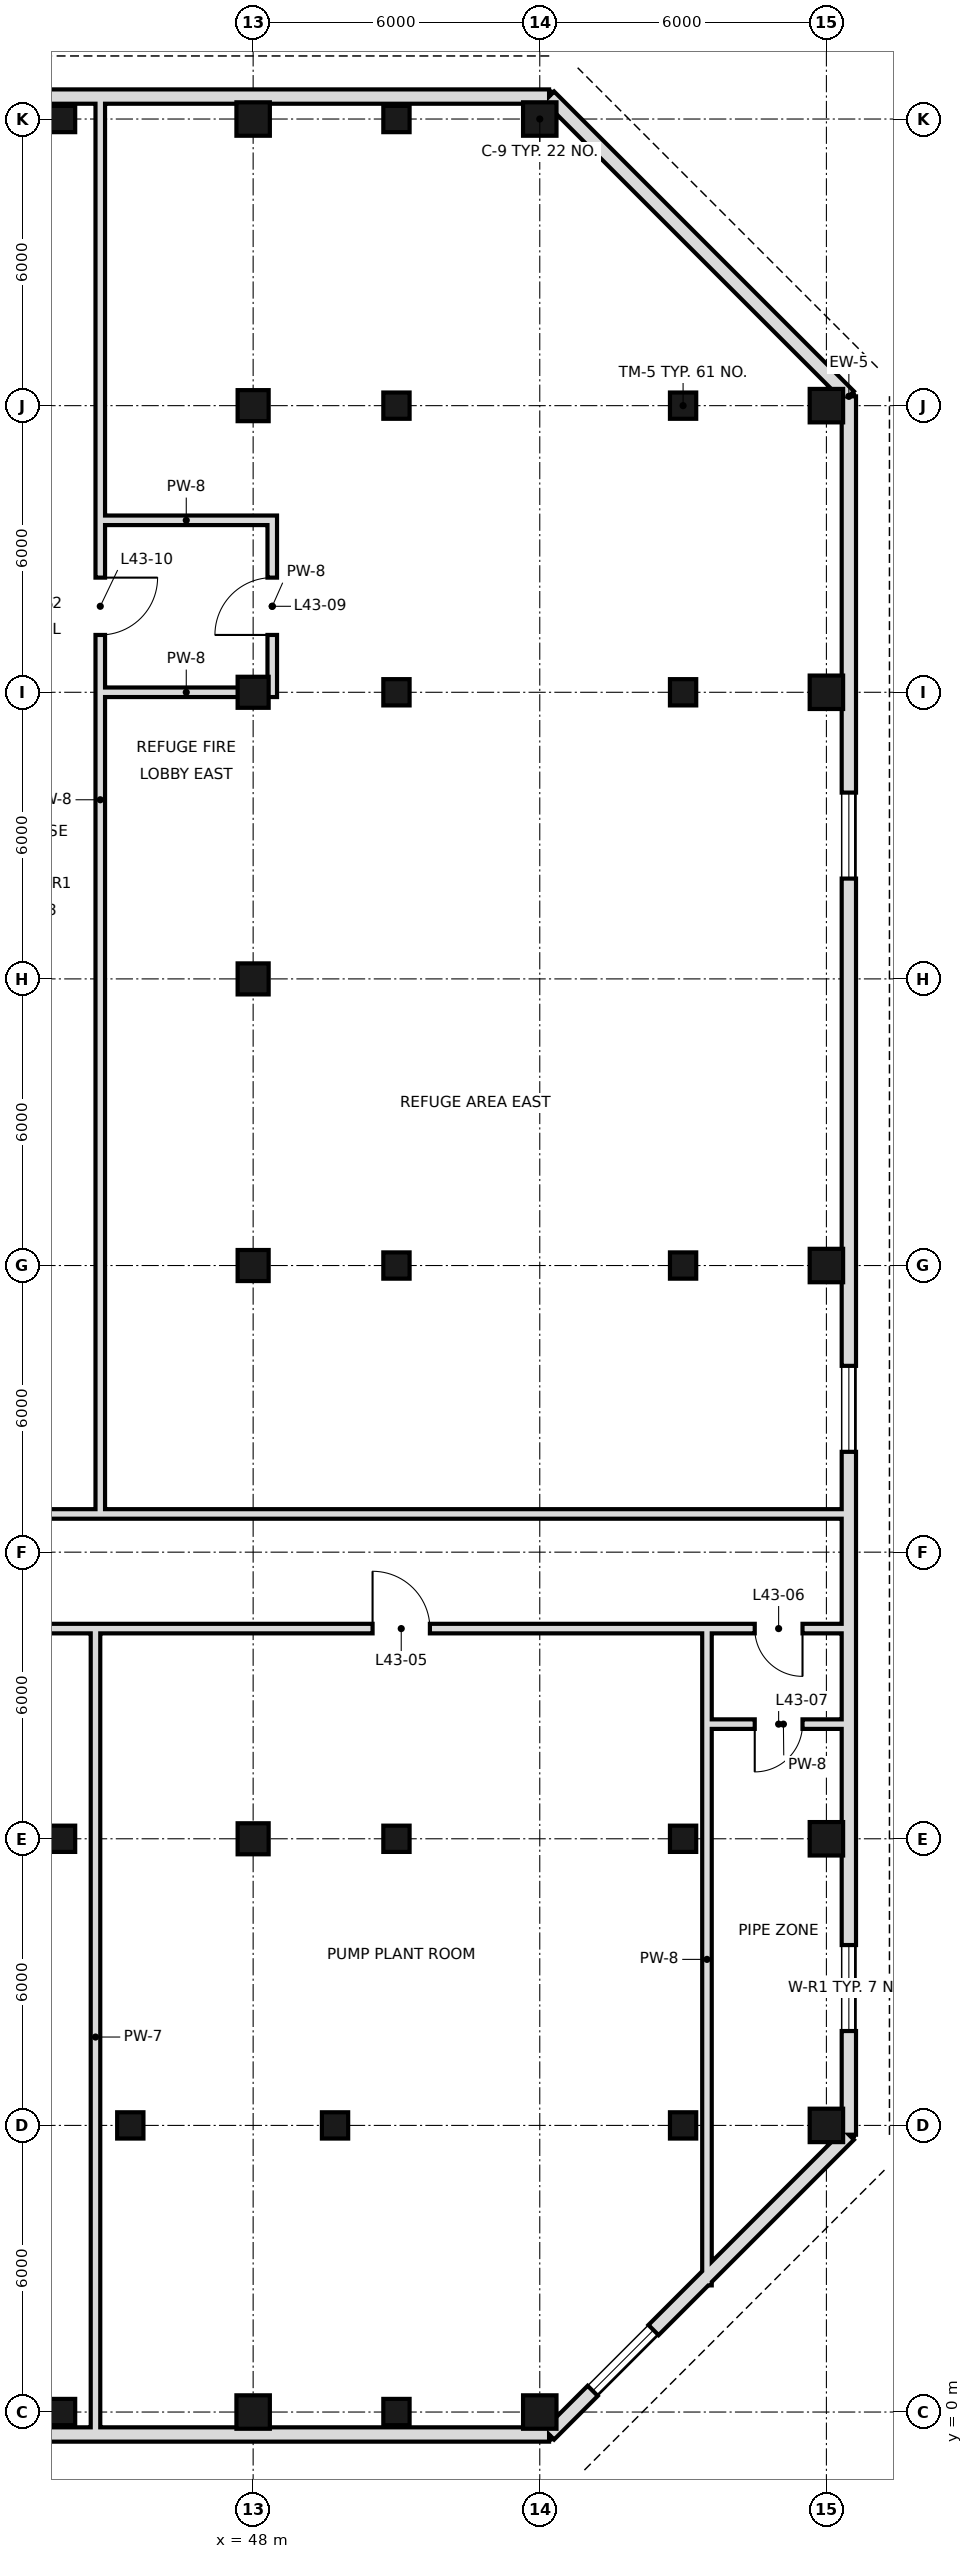
"""IFC4 building model, lengths in metres.
Left out: names, types, materials, properties, quantities, classifications, styles, units other than length and angle.
Written with IfcOpenShell. Run it as: python <this file> out.ifc"""

import sys

from ifc_helpers import new_model, si_unit, direction, frame, frame_2d, origin, origin_2d, place, context, subcontext, project, spatial, rectangle, hollow_rectangle, extrude, element, fill, save


model = new_model("IFC4")
c1 = context("Model", 3, precision=1e-05, world=origin(), true_north=direction((0.0, 1.0)))
c2 = subcontext(c1, "Body", "Model", "MODEL_VIEW")
j1 = project(units=[si_unit("LENGTHUNIT", "METRE"), si_unit("PLANEANGLEUNIT", "RADIAN")], contexts=[c1])
p1 = place(None, origin())
s1 = spatial("IfcSite", under=j1, at=p1, CompositionType="ELEMENT")
p2 = place(p1, origin())
s2 = spatial("IfcBuilding", under=s1, at=p2, CompositionType="ELEMENT")
p3 = place(p2, frame((0.0, 0.0, 186.0)))
s3 = spatial("IfcBuildingStorey", under=s2, at=p3, CompositionType="ELEMENT", Elevation=186.0)
p4 = place(p3, frame((48.0, 0.0, 0.0), z_axis=(0.0, 0.0, 1.0), x_axis=(1.0, 0.0, 0.0)))
e1 = element("IfcColumn", 1, at=p4, inside=s3, PredefinedType="COLUMN", context=c2, shape_type="SweptSolid", body=[
    extrude(hollow_rectangle(XDim=0.7, YDim=0.7, WallThickness=0.036, at=origin_2d()), origin(), (0.0, 0.0, 1.0), 6.0),
])
for number, where, z_axis, x_axis in (
    (2, (48.0, 12.0, 0.0), (0.0, 0.0, 1.0), (1.0, 0.0, 0.0)),
    (3, (48.0, 24.0, 0.0), (0.0, 0.0, 1.0), (1.0, 0.0, 0.0)),
    (4, (48.0, 30.0, 0.0), (0.0, 0.0, 1.0), (1.0, 0.0, 0.0)),
    (5, (48.0, 36.0, 0.0), (0.0, 0.0, 1.0), (1.0, 0.0, 0.0)),
    (6, (48.0, 42.0, 0.0), (0.0, 0.0, 1.0), (1.0, 0.0, 0.0)),
):
    element("IfcColumn", number, at=place(p3, frame(where, z_axis=z_axis, x_axis=x_axis)), inside=s3, PredefinedType="COLUMN", context=c2, shape_type="SweptSolid", body=[
        extrude(hollow_rectangle(XDim=0.65, YDim=0.65, WallThickness=0.032, at=origin_2d()), origin(), (0.0, 0.0, 1.0), 6.0),
    ])
for number, where, z_axis, x_axis in (
    (7, (48.0, 48.0, 0.0), (0.0, 0.0, 1.0), (1.0, 0.0, 0.0)),
    (8, (54.0, 0.0, 0.0), (0.0, 0.0, 1.0), (1.0, 0.0, 0.0)),
    (9, (54.0, 48.0, 0.0), (0.0, 0.0, 1.0), (1.0, 0.0, 0.0)),
    (10, (60.0, 6.0, 0.0), (0.0, 0.0, 1.0), (1.0, 0.0, 0.0)),
    (11, (60.0, 12.0, 0.0), (0.0, 0.0, 1.0), (1.0, 0.0, 0.0)),
    (12, (60.0, 24.0, 0.0), (0.0, 0.0, 1.0), (1.0, 0.0, 0.0)),
    (13, (60.0, 36.0, 0.0), (0.0, 0.0, 1.0), (1.0, 0.0, 0.0)),
    (14, (60.0, 42.0, 0.0), (0.0, 0.0, 1.0), (1.0, 0.0, 0.0)),
):
    element("IfcColumn", number, at=place(p3, frame(where, z_axis=z_axis, x_axis=x_axis)), inside=s3, PredefinedType="COLUMN", context=c2, shape_type="SweptSolid", body=[
        extrude(hollow_rectangle(XDim=0.7, YDim=0.7, WallThickness=0.036, at=origin_2d()), origin(), (0.0, 0.0, 1.0), 6.0),
    ])
for number, where, z_axis, x_axis in (
    (15, (44.0, 0.0, 1.1), (0.0, 0.0, 1.0), (1.0, 0.0, 0.0)),
    (16, (51.0, 0.0, 1.1), (0.0, 0.0, 1.0), (1.0, 0.0, 0.0)),
    (17, (45.428, 6.0, 1.1), (0.0, 0.0, 1.0), (1.0, 0.0, 0.0)),
    (18, (49.714, 6.0, 1.1), (0.0, 0.0, 1.0), (1.0, 0.0, 0.0)),
    (19, (57.0, 6.0, 1.1), (0.0, 0.0, 1.0), (1.0, 0.0, 0.0)),
    (20, (44.0, 12.0, 1.1), (0.0, 0.0, 1.0), (1.0, 0.0, 0.0)),
    (21, (51.0, 12.0, 1.1), (0.0, 0.0, 1.0), (1.0, 0.0, 0.0)),
    (22, (57.0, 12.0, 1.1), (0.0, 0.0, 1.0), (1.0, 0.0, 0.0)),
    (23, (51.0, 24.0, 1.1), (0.0, 0.0, 1.0), (1.0, 0.0, 0.0)),
    (24, (57.0, 24.0, 1.1), (0.0, 0.0, 1.0), (1.0, 0.0, 0.0)),
    (25, (51.0, 36.0, 1.1), (0.0, 0.0, 1.0), (1.0, 0.0, 0.0)),
    (26, (57.0, 36.0, 1.1), (0.0, 0.0, 1.0), (1.0, 0.0, 0.0)),
    (27, (51.0, 42.0, 1.1), (0.0, 0.0, 1.0), (1.0, 0.0, 0.0)),
    (28, (57.0, 42.0, 1.1), (0.0, 0.0, 1.0), (1.0, 0.0, 0.0)),
    (29, (44.0, 48.0, 1.1), (0.0, 0.0, 1.0), (1.0, 0.0, 0.0)),
    (30, (51.0, 48.0, 1.1), (0.0, 0.0, 1.0), (1.0, 0.0, 0.0)),
):
    element("IfcColumn", number, at=place(p3, frame(where, z_axis=z_axis, x_axis=x_axis)), inside=s3, PredefinedType="COLUMN", context=c2, shape_type="SweptSolid", body=[
        extrude(hollow_rectangle(XDim=0.55, YDim=0.55, WallThickness=0.036, at=origin_2d()), origin(), (0.0, 0.0, 1.0), 3.5),
    ])
p5 = place(p3, frame((-0.195, -0.47, 0.0), z_axis=(0.0, 0.0, 1.0), x_axis=(1.0, 0.0, 0.0)))
e31 = element("IfcWall", 31, at=p5, inside=s3, PredefinedType="SOLIDWALL", context=c2, shape_type="SweptSolid", body=[
    extrude(rectangle(XDim=54.389, YDim=0.3, at=frame_2d((27.195, 0.0))), origin(), (0.0, 0.0, 1.0), 5.7),
])
p6 = place(p3, frame((54.195, -0.47, 0.0), z_axis=(0.0, 0.0, 1.0), x_axis=(0.707106781187, 0.707106781187, 0.0)))
e32 = element("IfcWall", 32, at=p6, inside=s3, PredefinedType="SOLIDWALL", context=c2, shape_type="SweptSolid", body=[
    extrude(rectangle(XDim=8.875, YDim=0.3, at=frame_2d((4.438, 0.0))), origin(), (0.0, 0.0, 1.0), 5.7),
])
p7 = place(p6, frame((1.292, 0.0, 0.9)))
e33 = element("IfcOpeningElement", 33, at=p7, cuts=e32, PredefinedType="OPENING", context=c2, shape_type="SweptSolid", body=[
    extrude(rectangle(XDim=1.8, YDim=1.5, at=frame_2d((0.9, 0.75))), frame((0.0, 0.16, 0.0), z_axis=(0.0, -1.0, 0.0), x_axis=(1.0, 0.0, 0.0)), (0.0, 0.0, 1.0), 0.32),
])
p8 = place(p3, frame((60.47, 5.805, 0.0), z_axis=(0.0, 0.0, 1.0), x_axis=(0.0, 1.0, 0.0)))
e34 = element("IfcWall", 34, at=p8, inside=s3, PredefinedType="SOLIDWALL", context=c2, shape_type="SweptSolid", body=[
    extrude(rectangle(XDim=36.389, YDim=0.3, at=frame_2d((18.195, 0.0))), origin(), (0.0, 0.0, 1.0), 5.7),
])
p9 = place(p8, frame((2.17, 0.0, 0.9)))
e35 = element("IfcOpeningElement", 35, at=p9, cuts=e34, PredefinedType="OPENING", context=c2, shape_type="SweptSolid", body=[
    extrude(rectangle(XDim=1.8, YDim=1.5, at=frame_2d((0.9, 0.75))), frame((0.0, 0.16, 0.0), z_axis=(0.0, -1.0, 0.0), x_axis=(1.0, 0.0, 0.0)), (0.0, 0.0, 1.0), 0.32),
])
p10 = place(p8, frame((14.295, 0.0, 0.9)))
e36 = element("IfcOpeningElement", 36, at=p10, cuts=e34, PredefinedType="OPENING", context=c2, shape_type="SweptSolid", body=[
    extrude(rectangle(XDim=1.8, YDim=1.5, at=frame_2d((0.9, 0.75))), frame((0.0, 0.16, 0.0), z_axis=(0.0, -1.0, 0.0), x_axis=(1.0, 0.0, 0.0)), (0.0, 0.0, 1.0), 0.32),
])
p11 = place(p8, frame((26.295, 0.0, 0.9)))
e37 = element("IfcOpeningElement", 37, at=p11, cuts=e34, PredefinedType="OPENING", context=c2, shape_type="SweptSolid", body=[
    extrude(rectangle(XDim=1.8, YDim=1.5, at=frame_2d((0.9, 0.75))), frame((0.0, 0.16, 0.0), z_axis=(0.0, -1.0, 0.0), x_axis=(1.0, 0.0, 0.0)), (0.0, 0.0, 1.0), 0.32),
])
p12 = place(p3, frame((60.47, 42.195, 0.0), z_axis=(0.0, 0.0, 1.0), x_axis=(-0.707106781187, 0.707106781187, 0.0)))
e38 = element("IfcWall", 38, at=p12, inside=s3, PredefinedType="SOLIDWALL", context=c2, shape_type="SweptSolid", body=[
    extrude(rectangle(XDim=8.875, YDim=0.3, at=frame_2d((4.438, 0.0))), origin(), (0.0, 0.0, 1.0), 5.7),
])
p13 = place(p3, frame((54.195, 48.47, 0.0), z_axis=(0.0, 0.0, 1.0), x_axis=(-1.0, 0.0, 0.0)))
e39 = element("IfcWall", 39, at=p13, inside=s3, PredefinedType="SOLIDWALL", context=c2, shape_type="SweptSolid", body=[
    extrude(rectangle(XDim=54.389, YDim=0.3, at=frame_2d((27.195, 0.0))), origin(), (0.0, 0.0, 1.0), 5.7),
])
p14 = place(p3, frame((44.7, -0.6, 0.0), z_axis=(0.0, 0.0, 1.0), x_axis=(0.0, 1.0, 0.0)))
e40 = element("IfcWall", 40, at=p14, inside=s3, PredefinedType="SOLIDWALL", context=c2, shape_type="SweptSolid", body=[
    extrude(rectangle(XDim=16.9, YDim=0.2, at=frame_2d((8.45, 0.0))), origin(), (0.0, 0.0, 1.0), 5.7),
])
p15 = place(p3, frame((44.8, 18.9, 0.0), z_axis=(0.0, 0.0, 1.0), x_axis=(0.0, 1.0, 0.0)))
e41 = element("IfcWall", 41, at=p15, inside=s3, PredefinedType="SOLIDWALL", context=c2, shape_type="SweptSolid", body=[
    extrude(rectangle(XDim=29.7, YDim=0.2, at=frame_2d((14.85, 0.0))), origin(), (0.0, 0.0, 1.0), 5.25),
])
p16 = place(p15, frame((18.3, 0.0, 0.0)))
e42 = element("IfcOpeningElement", 42, at=p16, cuts=e41, PredefinedType="OPENING", context=c2, shape_type="SweptSolid", body=[
    extrude(rectangle(XDim=1.2, YDim=2.4, at=frame_2d((0.6, 1.2))), frame((0.0, 0.11, 0.0), z_axis=(0.0, -1.0, 0.0), x_axis=(1.0, 0.0, 0.0)), (0.0, 0.0, 1.0), 0.22),
])
p17 = place(p3, frame((48.4, 35.9, 0.0), z_axis=(0.0, 0.0, 1.0), x_axis=(0.0, 1.0, 0.0)))
e43 = element("IfcWall", 43, at=p17, inside=s3, PredefinedType="SOLIDWALL", context=c2, shape_type="SweptSolid", body=[
    extrude(rectangle(XDim=3.8, YDim=0.2, at=frame_2d((1.9, 0.0))), origin(), (0.0, 0.0, 1.0), 5.7),
])
p18 = place(p17, frame((1.3, 0.0, 0.0)))
e44 = element("IfcOpeningElement", 44, at=p18, cuts=e43, PredefinedType="OPENING", context=c2, shape_type="SweptSolid", body=[
    extrude(rectangle(XDim=1.2, YDim=2.4, at=frame_2d((0.6, 1.2))), frame((0.0, 0.11, 0.0), z_axis=(0.0, -1.0, 0.0), x_axis=(1.0, 0.0, 0.0)), (0.0, 0.0, 1.0), 0.22),
])
p19 = place(p3, frame((57.5, 2.651, 0.0), z_axis=(0.0, 0.0, 1.0), x_axis=(0.0, 1.0, 0.0)))
e45 = element("IfcWall", 45, at=p19, inside=s3, PredefinedType="SOLIDWALL", context=c2, shape_type="SweptSolid", body=[
    extrude(rectangle(XDim=13.649, YDim=0.2, at=frame_2d((6.825, 0.0))), origin(), (0.0, 0.0, 1.0), 5.7),
])
p20 = place(p3, frame((57.6, 14.4, 0.0), z_axis=(0.0, 0.0, 1.0), x_axis=(1.0, 0.0, 0.0)))
e46 = element("IfcWall", 46, at=p20, inside=s3, PredefinedType="SOLIDWALL", context=c2, shape_type="SweptSolid", body=[
    extrude(rectangle(XDim=3.0, YDim=0.2, at=frame_2d((1.5, 0.0))), origin(), (0.0, 0.0, 1.0), 5.7),
])
p21 = place(p20, frame((0.9, 0.0, 0.0)))
e47 = element("IfcOpeningElement", 47, at=p21, cuts=e46, PredefinedType="OPENING", context=c2, shape_type="SweptSolid", body=[
    extrude(rectangle(XDim=1.0, YDim=2.4, at=frame_2d((0.5, 1.2))), frame((0.0, 0.11, 0.0), z_axis=(0.0, -1.0, 0.0), x_axis=(1.0, 0.0, 0.0)), (0.0, 0.0, 1.0), 0.22),
])
p22 = place(p3, frame((-6.6, 16.4, 0.0), z_axis=(0.0, 0.0, 1.0), x_axis=(1.0, 0.0, 0.0)))
e48 = element("IfcWall", 48, at=p22, inside=s3, PredefinedType="SOLIDWALL", context=c2, shape_type="SweptSolid", body=[
    extrude(rectangle(XDim=67.2, YDim=0.2, at=frame_2d((33.6, 0.0))), origin(), (0.0, 0.0, 1.0), 5.0),
])
p23 = place(p22, frame((6.0, 0.0, 0.0)))
e49 = element("IfcOpeningElement", 49, at=p23, cuts=e48, PredefinedType="OPENING", context=c2, shape_type="SweptSolid", body=[
    extrude(rectangle(XDim=1.0, YDim=2.4, at=frame_2d((0.5, 1.2))), frame((0.0, 0.11, 0.0), z_axis=(0.0, -1.0, 0.0), x_axis=(1.0, 0.0, 0.0)), (0.0, 0.0, 1.0), 0.22),
])
p24 = place(p22, frame((18.7, 0.0, 0.0)))
e50 = element("IfcOpeningElement", 50, at=p24, cuts=e48, PredefinedType="OPENING", context=c2, shape_type="SweptSolid", body=[
    extrude(rectangle(XDim=1.2, YDim=2.4, at=frame_2d((0.6, 1.2))), frame((0.0, 0.11, 0.0), z_axis=(0.0, -1.0, 0.0), x_axis=(1.0, 0.0, 0.0)), (0.0, 0.0, 1.0), 0.22),
])
p25 = place(p22, frame((31.5, 0.0, 0.0)))
e51 = element("IfcOpeningElement", 51, at=p25, cuts=e48, PredefinedType="OPENING", context=c2, shape_type="SweptSolid", body=[
    extrude(rectangle(XDim=1.2, YDim=2.4, at=frame_2d((0.6, 1.2))), frame((0.0, 0.11, 0.0), z_axis=(0.0, -1.0, 0.0), x_axis=(1.0, 0.0, 0.0)), (0.0, 0.0, 1.0), 0.22),
])
p26 = place(p22, frame((44.3, 0.0, 0.0)))
e52 = element("IfcOpeningElement", 52, at=p26, cuts=e48, PredefinedType="OPENING", context=c2, shape_type="SweptSolid", body=[
    extrude(rectangle(XDim=1.2, YDim=2.4, at=frame_2d((0.6, 1.2))), frame((0.0, 0.11, 0.0), z_axis=(0.0, -1.0, 0.0), x_axis=(1.0, 0.0, 0.0)), (0.0, 0.0, 1.0), 0.22),
])
p27 = place(p22, frame((57.1, 0.0, 0.0)))
e53 = element("IfcOpeningElement", 53, at=p27, cuts=e48, PredefinedType="OPENING", context=c2, shape_type="SweptSolid", body=[
    extrude(rectangle(XDim=1.2, YDim=2.4, at=frame_2d((0.6, 1.2))), frame((0.0, 0.11, 0.0), z_axis=(0.0, -1.0, 0.0), x_axis=(1.0, 0.0, 0.0)), (0.0, 0.0, 1.0), 0.22),
])
p28 = place(p22, frame((65.1, 0.0, 0.0)))
e54 = element("IfcOpeningElement", 54, at=p28, cuts=e48, PredefinedType="OPENING", context=c2, shape_type="SweptSolid", body=[
    extrude(rectangle(XDim=1.0, YDim=2.4, at=frame_2d((0.5, 1.2))), frame((0.0, 0.11, 0.0), z_axis=(0.0, -1.0, 0.0), x_axis=(1.0, 0.0, 0.0)), (0.0, 0.0, 1.0), 0.22),
])
p29 = place(p3, frame((-6.6, 18.8, 0.0), z_axis=(0.0, 0.0, 1.0), x_axis=(1.0, 0.0, 0.0)))
e55 = element("IfcWall", 55, at=p29, inside=s3, PredefinedType="SOLIDWALL", context=c2, shape_type="SweptSolid", body=[
    extrude(rectangle(XDim=67.2, YDim=0.2, at=frame_2d((33.6, 0.0))), origin(), (0.0, 0.0, 1.0), 5.0),
])
p30 = place(p29, frame((17.2, 0.0, 0.0)))
e56 = element("IfcOpeningElement", 56, at=p30, cuts=e55, PredefinedType="OPENING", context=c2, shape_type="SweptSolid", body=[
    extrude(rectangle(XDim=1.2, YDim=2.4, at=frame_2d((0.6, 1.2))), frame((0.0, 0.11, 0.0), z_axis=(0.0, -1.0, 0.0), x_axis=(1.0, 0.0, 0.0)), (0.0, 0.0, 1.0), 0.22),
])
p31 = place(p3, frame((44.9, 36.0, 0.0), z_axis=(0.0, 0.0, 1.0), x_axis=(1.0, 0.0, 0.0)))
e57 = element("IfcWall", 57, at=p31, inside=s3, PredefinedType="SOLIDWALL", context=c2, shape_type="SweptSolid", body=[
    extrude(rectangle(XDim=3.4, YDim=0.2, at=frame_2d((1.7, 0.0))), origin(), (0.0, 0.0, 1.0), 5.7),
])
p32 = place(p3, frame((44.9, 39.6, 0.0), z_axis=(0.0, 0.0, 1.0), x_axis=(1.0, 0.0, 0.0)))
e58 = element("IfcWall", 58, at=p32, inside=s3, PredefinedType="SOLIDWALL", context=c2, shape_type="SweptSolid", body=[
    extrude(rectangle(XDim=3.4, YDim=0.2, at=frame_2d((1.7, 0.0))), origin(), (0.0, 0.0, 1.0), 5.25),
])
p33 = place(p7, origin())
e59 = element("IfcWindow", 59, at=p33, inside=s3, PartitioningType="SINGLE_PANEL", PredefinedType="WINDOW", context=c2, shape_type="SweptSolid", body=[
    extrude(rectangle(XDim=1.8, YDim=1.5, at=frame_2d((0.9, 0.75))), frame((0.0, 0.03, 0.0), z_axis=(0.0, -1.0, 0.0), x_axis=(1.0, 0.0, 0.0)), (0.0, 0.0, 1.0), 0.06),
])
fill(e33, e59)
p34 = place(p9, origin())
e60 = element("IfcWindow", 60, at=p34, inside=s3, PartitioningType="SINGLE_PANEL", PredefinedType="WINDOW", context=c2, shape_type="SweptSolid", body=[
    extrude(rectangle(XDim=1.8, YDim=1.5, at=frame_2d((0.9, 0.75))), frame((0.0, 0.03, 0.0), z_axis=(0.0, -1.0, 0.0), x_axis=(1.0, 0.0, 0.0)), (0.0, 0.0, 1.0), 0.06),
])
fill(e35, e60)
p35 = place(p10, origin())
e61 = element("IfcWindow", 61, at=p35, inside=s3, PartitioningType="SINGLE_PANEL", PredefinedType="WINDOW", context=c2, shape_type="SweptSolid", body=[
    extrude(rectangle(XDim=1.8, YDim=1.5, at=frame_2d((0.9, 0.75))), frame((0.0, 0.03, 0.0), z_axis=(0.0, -1.0, 0.0), x_axis=(1.0, 0.0, 0.0)), (0.0, 0.0, 1.0), 0.06),
])
fill(e36, e61)
p36 = place(p11, origin())
e62 = element("IfcWindow", 62, at=p36, inside=s3, PartitioningType="SINGLE_PANEL", PredefinedType="WINDOW", context=c2, shape_type="SweptSolid", body=[
    extrude(rectangle(XDim=1.8, YDim=1.5, at=frame_2d((0.9, 0.75))), frame((0.0, 0.03, 0.0), z_axis=(0.0, -1.0, 0.0), x_axis=(1.0, 0.0, 0.0)), (0.0, 0.0, 1.0), 0.06),
])
fill(e37, e62)
p37 = place(p27, origin())
e63 = element("IfcDoor", 63, at=p37, inside=s3, OperationType="SINGLE_SWING_LEFT", PredefinedType="DOOR", context=c2, shape_type="SweptSolid", body=[
    extrude(rectangle(XDim=1.2, YDim=2.4, at=frame_2d((0.6, 1.2))), frame((0.0, 0.025, 0.0), z_axis=(0.0, -1.0, 0.0), x_axis=(1.0, 0.0, 0.0)), (0.0, 0.0, 1.0), 0.05),
])
fill(e53, e63)
p38 = place(p28, origin())
e64 = element("IfcDoor", 64, at=p38, inside=s3, OperationType="SINGLE_SWING_RIGHT", PredefinedType="DOOR", context=c2, shape_type="SweptSolid", body=[
    extrude(rectangle(XDim=1.0, YDim=2.4, at=frame_2d((0.5, 1.2))), frame((0.0, 0.025, 0.0), z_axis=(0.0, -1.0, 0.0), x_axis=(1.0, 0.0, 0.0)), (0.0, 0.0, 1.0), 0.05),
])
fill(e54, e64)
p39 = place(p21, frame((1.0, 0.0, 0.0), z_axis=(0.0, 0.0, 1.0), x_axis=(-1.0, 0.0, 0.0)))
e65 = element("IfcDoor", 65, at=p39, inside=s3, OperationType="SINGLE_SWING_RIGHT", PredefinedType="DOOR", context=c2, shape_type="SweptSolid", body=[
    extrude(rectangle(XDim=1.0, YDim=2.4, at=frame_2d((0.5, 1.2))), frame((0.0, 0.025, 0.0), z_axis=(0.0, -1.0, 0.0), x_axis=(1.0, 0.0, 0.0)), (0.0, 0.0, 1.0), 0.05),
])
fill(e47, e65)
p40 = place(p18, origin())
e66 = element("IfcDoor", 66, at=p40, inside=s3, OperationType="SINGLE_SWING_LEFT", PredefinedType="DOOR", context=c2, shape_type="SweptSolid", body=[
    extrude(rectangle(XDim=1.2, YDim=2.4, at=frame_2d((0.6, 1.2))), frame((0.0, 0.025, 0.0), z_axis=(0.0, -1.0, 0.0), x_axis=(1.0, 0.0, 0.0)), (0.0, 0.0, 1.0), 0.05),
])
fill(e44, e66)
p41 = place(p16, origin())
e67 = element("IfcDoor", 67, at=p41, inside=s3, OperationType="SINGLE_SWING_RIGHT", PredefinedType="DOOR", context=c2, shape_type="SweptSolid", body=[
    extrude(rectangle(XDim=1.2, YDim=2.4, at=frame_2d((0.6, 1.2))), frame((0.0, 0.025, 0.0), z_axis=(0.0, -1.0, 0.0), x_axis=(1.0, 0.0, 0.0)), (0.0, 0.0, 1.0), 0.05),
])
fill(e42, e67)
save(model, sys.argv[1])
